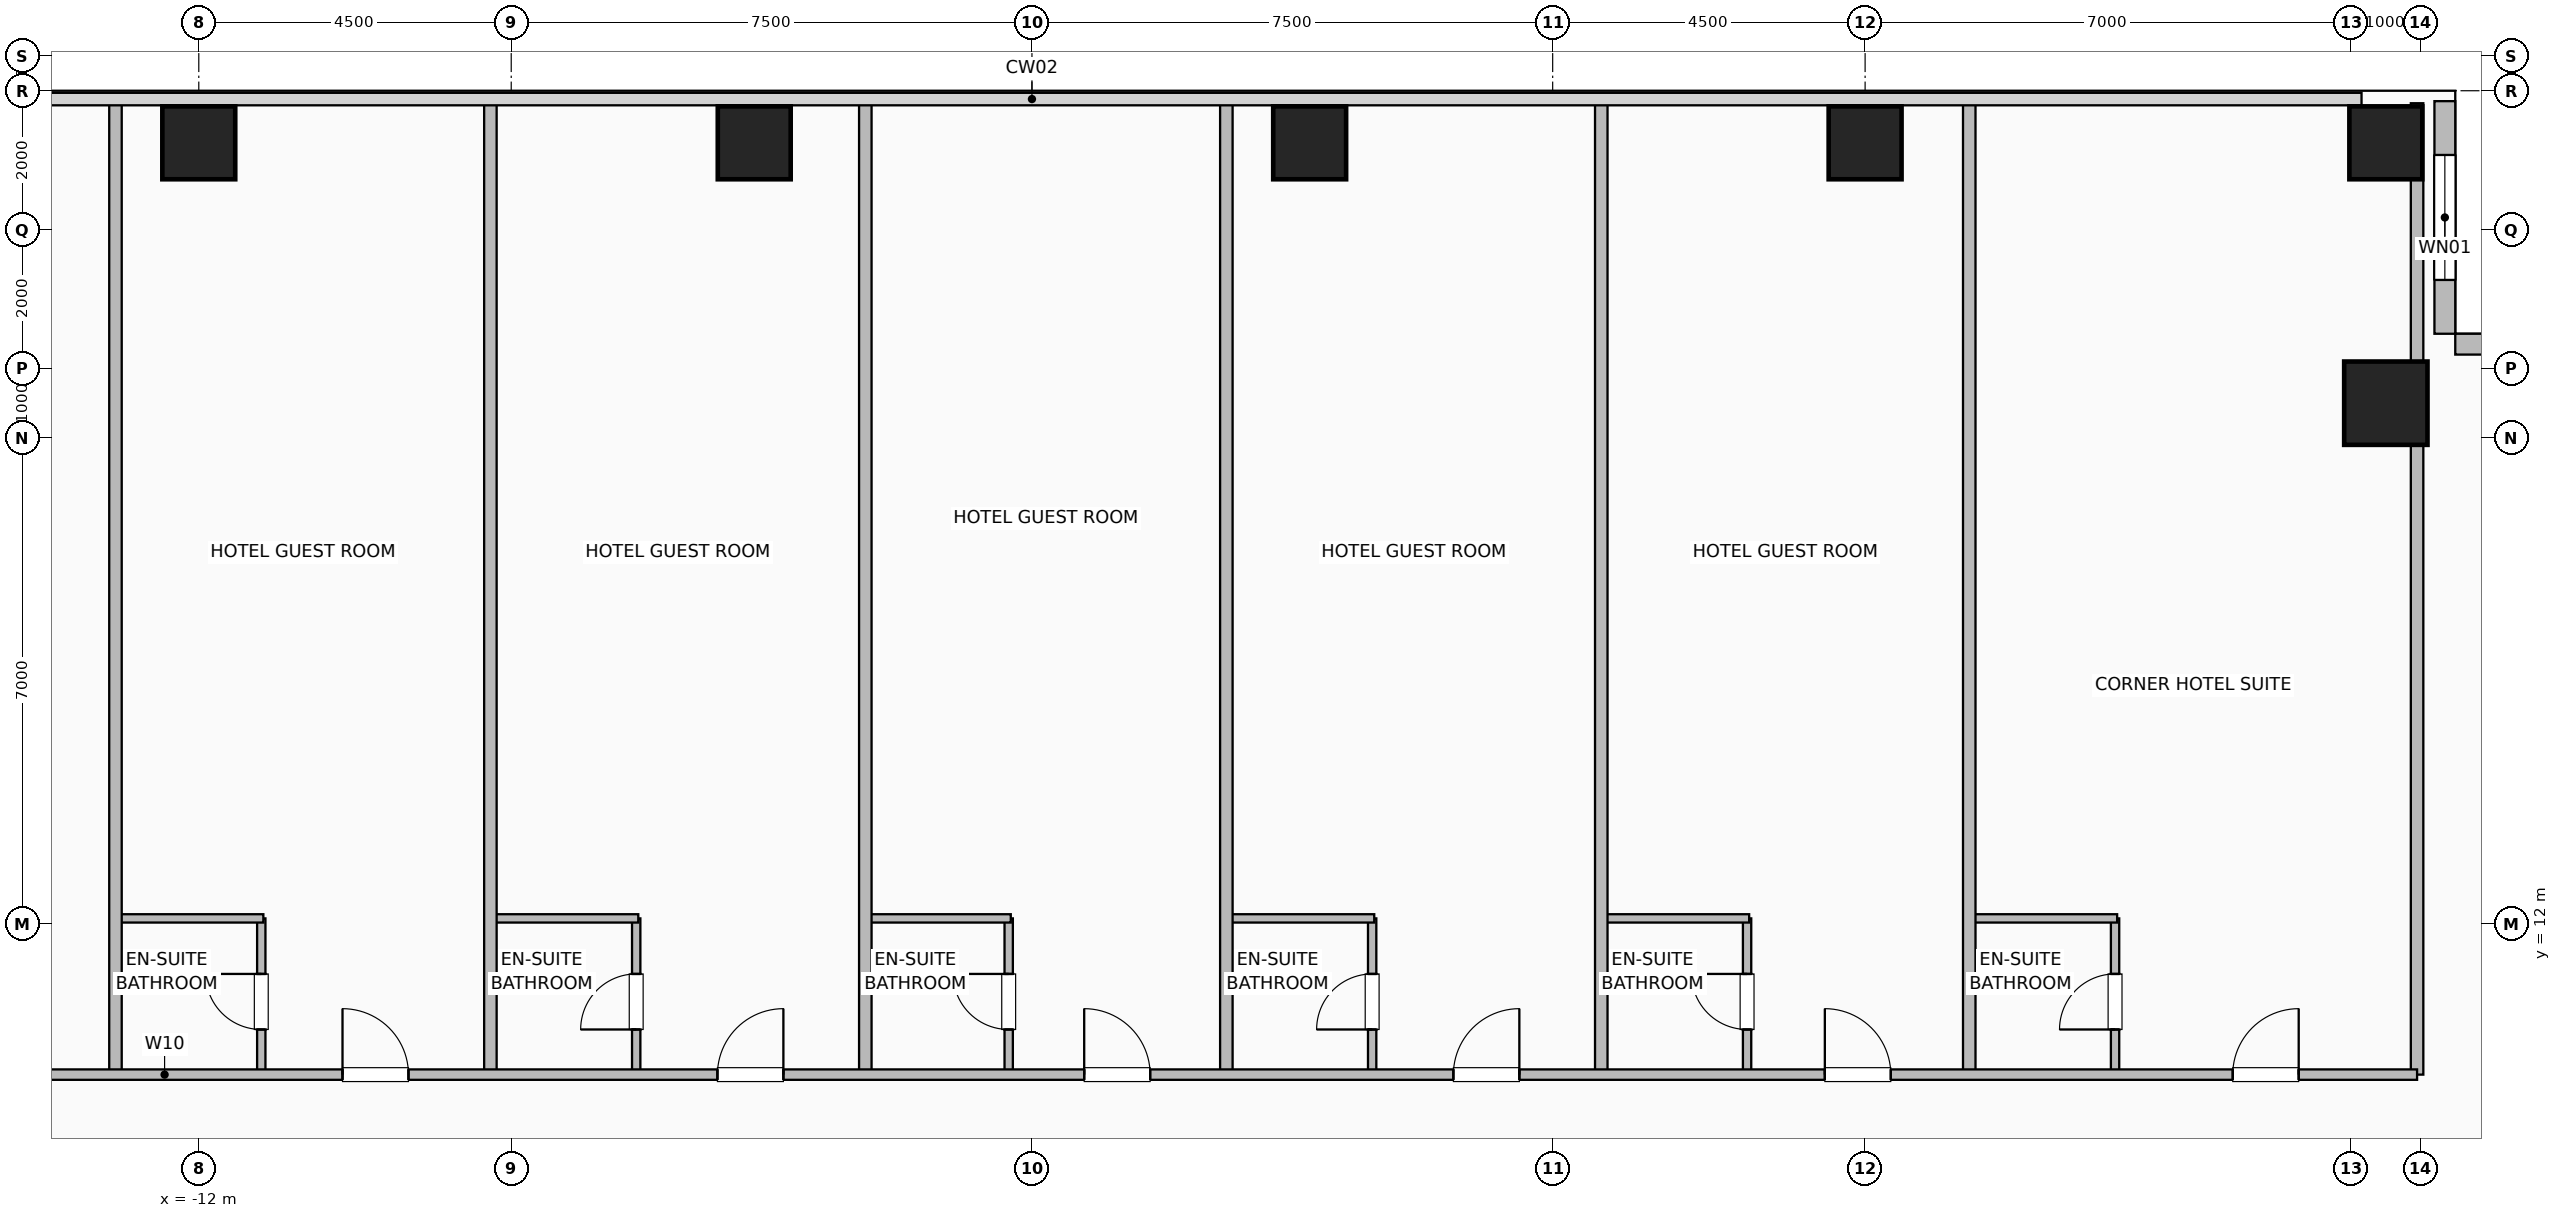
"""IFC4 building model, lengths in metres.
Left out: names, types, materials, properties, quantities, classifications, styles, units other than length and angle.
Written with IfcOpenShell. Run it as: python <this file> out.ifc"""

import sys

from ifc_helpers import new_model, si_unit, direction, frame, frame_2d, origin, origin_2d, place, context, subcontext, project, spatial, rectangle, hollow_rectangle, extrude, element, fill, save


model = new_model("IFC4")
c1 = context("Model", 3, precision=1e-05, world=origin(), true_north=direction((0.0, 1.0)))
c2 = subcontext(c1, "Body", "Model", "MODEL_VIEW")
j1 = project(units=[si_unit("LENGTHUNIT", "METRE"), si_unit("PLANEANGLEUNIT", "RADIAN")], contexts=[c1])
p1 = place(None, origin())
s1 = spatial("IfcSite", under=j1, at=p1, CompositionType="ELEMENT")
p2 = place(p1, origin())
s2 = spatial("IfcBuilding", under=s1, at=p2, CompositionType="ELEMENT")
p3 = place(p2, frame((0.0, 0.0, 30.5)))
s3 = spatial("IfcBuildingStorey", under=s2, at=p3, CompositionType="ELEMENT", Elevation=30.5)
for number, where, z_axis, x_axis in (
    (1, (-12.0, 23.25, 0.0), (0.0, 0.0, 1.0), (1.0, 0.0, 0.0)),
    (2, (-4.0, 23.25, 0.0), (0.0, 0.0, 1.0), (1.0, 0.0, 0.0)),
    (3, (4.0, 23.25, 0.0), (0.0, 0.0, 1.0), (1.0, 0.0, 0.0)),
    (4, (12.0, 23.25, 0.0), (0.0, 0.0, 1.0), (1.0, 0.0, 0.0)),
    (5, (19.5, 23.25, 0.0), (0.0, 0.0, 1.0), (1.0, 0.0, 0.0)),
):
    element("IfcColumn", number, at=place(p3, frame(where, z_axis=z_axis, x_axis=x_axis)), inside=s3, PredefinedType="COLUMN", context=c2, shape_type="SweptSolid", body=[
        extrude(hollow_rectangle(XDim=1.05, YDim=1.05, WallThickness=0.05, at=origin_2d()), origin(), (0.0, 0.0, 1.0), 3.5),
    ])
p4 = place(p3, frame((19.5, 19.5, 0.0), z_axis=(0.0, 0.0, 1.0), x_axis=(1.0, 0.0, 0.0)))
e6 = element("IfcColumn", 6, at=p4, inside=s3, PredefinedType="COLUMN", context=c2, shape_type="SweptSolid", body=[
    extrude(hollow_rectangle(XDim=1.2, YDim=1.2, WallThickness=0.055, at=origin_2d()), origin(), (0.0, 0.0, 1.0), 3.5),
])
p5 = place(p3, frame((20.35, 23.85, 0.0), z_axis=(0.0, 0.0, 1.0), x_axis=(0.0, -1.0, 0.0)))
e7 = element("IfcWall", 7, at=p5, inside=s3, PredefinedType="SOLIDWALL", context=c2, shape_type="SweptSolid", body=[
    extrude(rectangle(XDim=3.35, YDim=0.3, at=frame_2d((1.675, 0.0))), origin(), (0.0, 0.0, 1.0), 3.25),
])
p6 = place(p5, frame((0.775, 0.0, 0.9)))
e8 = element("IfcOpeningElement", 8, at=p6, cuts=e7, PredefinedType="OPENING", context=c2, shape_type="SweptSolid", body=[
    extrude(rectangle(XDim=1.8, YDim=1.8, at=frame_2d((0.9, 0.9))), frame((0.0, 0.16, 0.0), z_axis=(0.0, -1.0, 0.0), x_axis=(1.0, 0.0, 0.0)), (0.0, 0.0, 1.0), 0.32),
])
p7 = place(p3, frame((23.85, 20.35, 0.0), z_axis=(0.0, 0.0, 1.0), x_axis=(-1.0, 0.0, 0.0)))
e9 = element("IfcWall", 9, at=p7, inside=s3, PredefinedType="SOLIDWALL", context=c2, shape_type="SweptSolid", body=[
    extrude(rectangle(XDim=3.35, YDim=0.3, at=frame_2d((1.675, 0.0))), origin(), (0.0, 0.0, 1.0), 3.25),
])
p8 = place(p3, frame((-11.1, 9.83, 0.0), z_axis=(0.0, 0.0, 1.0), x_axis=(0.0, 1.0, 0.0)))
e10 = element("IfcWall", 10, at=p8, inside=s3, PredefinedType="PLUMBINGWALL", context=c2, shape_type="SweptSolid", body=[
    extrude(rectangle(XDim=2.25, YDim=0.12, at=frame_2d((1.125, 0.0))), origin(), (0.0, 0.0, 1.0), 3.25),
])
p9 = place(p8, frame((0.65, 0.0, 0.0)))
e11 = element("IfcOpeningElement", 11, at=p9, cuts=e10, PredefinedType="OPENING", context=c2, shape_type="SweptSolid", body=[
    extrude(rectangle(XDim=0.8, YDim=2.05, at=frame_2d((0.4, 1.025))), frame((0.0, 0.07, 0.0), z_axis=(0.0, -1.0, 0.0), x_axis=(1.0, 0.0, 0.0)), (0.0, 0.0, 1.0), 0.14),
])
p10 = place(p3, frame((-13.17, 12.08, 0.0), z_axis=(0.0, 0.0, 1.0), x_axis=(1.0, 0.0, 0.0)))
e12 = element("IfcWall", 12, at=p10, inside=s3, PredefinedType="PLUMBINGWALL", context=c2, shape_type="SweptSolid", body=[
    extrude(rectangle(XDim=2.1, YDim=0.12, at=frame_2d((1.05, 0.0))), origin(), (0.0, 0.0, 1.0), 3.25),
])
p11 = place(p3, frame((-5.7, 9.83, 0.0), z_axis=(0.0, 0.0, 1.0), x_axis=(0.0, 1.0, 0.0)))
e13 = element("IfcWall", 13, at=p11, inside=s3, PredefinedType="PLUMBINGWALL", context=c2, shape_type="SweptSolid", body=[
    extrude(rectangle(XDim=2.25, YDim=0.12, at=frame_2d((1.125, 0.0))), origin(), (0.0, 0.0, 1.0), 3.25),
])
p12 = place(p11, frame((0.65, 0.0, 0.0)))
e14 = element("IfcOpeningElement", 14, at=p12, cuts=e13, PredefinedType="OPENING", context=c2, shape_type="SweptSolid", body=[
    extrude(rectangle(XDim=0.8, YDim=2.05, at=frame_2d((0.4, 1.025))), frame((0.0, 0.07, 0.0), z_axis=(0.0, -1.0, 0.0), x_axis=(1.0, 0.0, 0.0)), (0.0, 0.0, 1.0), 0.14),
])
p13 = place(p3, frame((-7.77, 12.08, 0.0), z_axis=(0.0, 0.0, 1.0), x_axis=(1.0, 0.0, 0.0)))
e15 = element("IfcWall", 15, at=p13, inside=s3, PredefinedType="PLUMBINGWALL", context=c2, shape_type="SweptSolid", body=[
    extrude(rectangle(XDim=2.1, YDim=0.12, at=frame_2d((1.05, 0.0))), origin(), (0.0, 0.0, 1.0), 3.25),
])
p14 = place(p3, frame((-0.335, 9.83, 0.0), z_axis=(0.0, 0.0, 1.0), x_axis=(0.0, 1.0, 0.0)))
e16 = element("IfcWall", 16, at=p14, inside=s3, PredefinedType="PLUMBINGWALL", context=c2, shape_type="SweptSolid", body=[
    extrude(rectangle(XDim=2.25, YDim=0.12, at=frame_2d((1.125, 0.0))), origin(), (0.0, 0.0, 1.0), 3.25),
])
p15 = place(p14, frame((0.65, 0.0, 0.0)))
e17 = element("IfcOpeningElement", 17, at=p15, cuts=e16, PredefinedType="OPENING", context=c2, shape_type="SweptSolid", body=[
    extrude(rectangle(XDim=0.8, YDim=2.05, at=frame_2d((0.4, 1.025))), frame((0.0, 0.07, 0.0), z_axis=(0.0, -1.0, 0.0), x_axis=(1.0, 0.0, 0.0)), (0.0, 0.0, 1.0), 0.14),
])
p16 = place(p3, frame((-2.37, 12.08, 0.0), z_axis=(0.0, 0.0, 1.0), x_axis=(1.0, 0.0, 0.0)))
e18 = element("IfcWall", 18, at=p16, inside=s3, PredefinedType="PLUMBINGWALL", context=c2, shape_type="SweptSolid", body=[
    extrude(rectangle(XDim=2.065, YDim=0.12, at=frame_2d((1.033, 0.0))), origin(), (0.0, 0.0, 1.0), 3.25),
])
p17 = place(p3, frame((4.9, 9.83, 0.0), z_axis=(0.0, 0.0, 1.0), x_axis=(0.0, 1.0, 0.0)))
e19 = element("IfcWall", 19, at=p17, inside=s3, PredefinedType="PLUMBINGWALL", context=c2, shape_type="SweptSolid", body=[
    extrude(rectangle(XDim=2.25, YDim=0.12, at=frame_2d((1.125, 0.0))), origin(), (0.0, 0.0, 1.0), 3.25),
])
p18 = place(p17, frame((0.65, 0.0, 0.0)))
e20 = element("IfcOpeningElement", 20, at=p18, cuts=e19, PredefinedType="OPENING", context=c2, shape_type="SweptSolid", body=[
    extrude(rectangle(XDim=0.8, YDim=2.05, at=frame_2d((0.4, 1.025))), frame((0.0, 0.07, 0.0), z_axis=(0.0, -1.0, 0.0), x_axis=(1.0, 0.0, 0.0)), (0.0, 0.0, 1.0), 0.14),
])
p19 = place(p3, frame((2.83, 12.08, 0.0), z_axis=(0.0, 0.0, 1.0), x_axis=(1.0, 0.0, 0.0)))
e21 = element("IfcWall", 21, at=p19, inside=s3, PredefinedType="PLUMBINGWALL", context=c2, shape_type="SweptSolid", body=[
    extrude(rectangle(XDim=2.1, YDim=0.12, at=frame_2d((1.05, 0.0))), origin(), (0.0, 0.0, 1.0), 3.25),
])
p20 = place(p3, frame((10.3, 9.83, 0.0), z_axis=(0.0, 0.0, 1.0), x_axis=(0.0, 1.0, 0.0)))
e22 = element("IfcWall", 22, at=p20, inside=s3, PredefinedType="PLUMBINGWALL", context=c2, shape_type="SweptSolid", body=[
    extrude(rectangle(XDim=2.25, YDim=0.12, at=frame_2d((1.125, 0.0))), origin(), (0.0, 0.0, 1.0), 3.25),
])
p21 = place(p20, frame((0.65, 0.0, 0.0)))
e23 = element("IfcOpeningElement", 23, at=p21, cuts=e22, PredefinedType="OPENING", context=c2, shape_type="SweptSolid", body=[
    extrude(rectangle(XDim=0.8, YDim=2.05, at=frame_2d((0.4, 1.025))), frame((0.0, 0.07, 0.0), z_axis=(0.0, -1.0, 0.0), x_axis=(1.0, 0.0, 0.0)), (0.0, 0.0, 1.0), 0.14),
])
p22 = place(p3, frame((8.23, 12.08, 0.0), z_axis=(0.0, 0.0, 1.0), x_axis=(1.0, 0.0, 0.0)))
e24 = element("IfcWall", 24, at=p22, inside=s3, PredefinedType="PLUMBINGWALL", context=c2, shape_type="SweptSolid", body=[
    extrude(rectangle(XDim=2.1, YDim=0.12, at=frame_2d((1.05, 0.0))), origin(), (0.0, 0.0, 1.0), 3.25),
])
p23 = place(p3, frame((15.6, 9.83, 0.0), z_axis=(0.0, 0.0, 1.0), x_axis=(0.0, 1.0, 0.0)))
e25 = element("IfcWall", 25, at=p23, inside=s3, PredefinedType="PLUMBINGWALL", context=c2, shape_type="SweptSolid", body=[
    extrude(rectangle(XDim=2.25, YDim=0.12, at=frame_2d((1.125, 0.0))), origin(), (0.0, 0.0, 1.0), 3.25),
])
p24 = place(p23, frame((0.65, 0.0, 0.0)))
e26 = element("IfcOpeningElement", 26, at=p24, cuts=e25, PredefinedType="OPENING", context=c2, shape_type="SweptSolid", body=[
    extrude(rectangle(XDim=0.8, YDim=2.05, at=frame_2d((0.4, 1.025))), frame((0.0, 0.07, 0.0), z_axis=(0.0, -1.0, 0.0), x_axis=(1.0, 0.0, 0.0)), (0.0, 0.0, 1.0), 0.14),
])
p25 = place(p3, frame((13.53, 12.08, 0.0), z_axis=(0.0, 0.0, 1.0), x_axis=(1.0, 0.0, 0.0)))
e27 = element("IfcWall", 27, at=p25, inside=s3, PredefinedType="PLUMBINGWALL", context=c2, shape_type="SweptSolid", body=[
    extrude(rectangle(XDim=2.1, YDim=0.12, at=frame_2d((1.05, 0.0))), origin(), (0.0, 0.0, 1.0), 3.25),
])
for number, where, z_axis, x_axis in (
    (28, (-13.2, 9.83, 0.0), (0.0, 0.0, 1.0), (0.0, 1.0, 0.0)),
    (29, (-7.8, 9.83, 0.0), (0.0, 0.0, 1.0), (0.0, 1.0, 0.0)),
    (30, (-2.4, 9.83, 0.0), (0.0, 0.0, 1.0), (0.0, 1.0, 0.0)),
    (31, (2.8, 9.83, 0.0), (0.0, 0.0, 1.0), (0.0, 1.0, 0.0)),
    (32, (8.2, 9.83, 0.0), (0.0, 0.0, 1.0), (0.0, 1.0, 0.0)),
    (33, (13.5, 9.83, 0.0), (0.0, 0.0, 1.0), (0.0, 1.0, 0.0)),
    (34, (19.95, 9.83, 0.0), (0.0, 0.0, 1.0), (0.0, 1.0, 0.0)),
):
    element("IfcWall", number, at=place(p3, frame(where, z_axis=z_axis, x_axis=x_axis)), inside=s3, PredefinedType="PARTITIONING", context=c2, shape_type="SweptSolid", body=[
        extrude(rectangle(XDim=13.99, YDim=0.18, at=frame_2d((6.995, 0.0))), origin(), (0.0, 0.0, 1.0), 3.25),
    ])
p26 = place(p3, frame((-19.95, 9.83, 0.0), z_axis=(0.0, 0.0, 1.0), x_axis=(1.0, 0.0, 0.0)))
e35 = element("IfcWall", 35, at=p26, inside=s3, PredefinedType="PARTITIONING", context=c2, shape_type="SweptSolid", body=[
    extrude(rectangle(XDim=39.9, YDim=0.15, at=frame_2d((19.95, 0.0))), origin(), (0.0, 0.0, 1.0), 3.25),
])
p27 = place(p26, frame((3.945, 0.0, 0.0)))
e36 = element("IfcOpeningElement", 36, at=p27, cuts=e35, PredefinedType="OPENING", context=c2, shape_type="SweptSolid", body=[
    extrude(rectangle(XDim=0.95, YDim=2.08, at=frame_2d((0.475, 1.04))), frame((0.0, 0.085, 0.0), z_axis=(0.0, -1.0, 0.0), x_axis=(1.0, 0.0, 0.0)), (0.0, 0.0, 1.0), 0.17),
])
p28 = place(p26, frame((10.02, 0.0, 0.0)))
e37 = element("IfcOpeningElement", 37, at=p28, cuts=e35, PredefinedType="OPENING", context=c2, shape_type="SweptSolid", body=[
    extrude(rectangle(XDim=0.95, YDim=2.08, at=frame_2d((0.475, 1.04))), frame((0.0, 0.085, 0.0), z_axis=(0.0, -1.0, 0.0), x_axis=(1.0, 0.0, 0.0)), (0.0, 0.0, 1.0), 0.17),
])
p29 = place(p26, frame((15.42, 0.0, 0.0)))
e38 = element("IfcOpeningElement", 38, at=p29, cuts=e35, PredefinedType="OPENING", context=c2, shape_type="SweptSolid", body=[
    extrude(rectangle(XDim=0.95, YDim=2.08, at=frame_2d((0.475, 1.04))), frame((0.0, 0.085, 0.0), z_axis=(0.0, -1.0, 0.0), x_axis=(1.0, 0.0, 0.0)), (0.0, 0.0, 1.0), 0.17),
])
p30 = place(p26, frame((20.702, 0.0, 0.0)))
e39 = element("IfcOpeningElement", 39, at=p30, cuts=e35, PredefinedType="OPENING", context=c2, shape_type="SweptSolid", body=[
    extrude(rectangle(XDim=0.95, YDim=2.08, at=frame_2d((0.475, 1.04))), frame((0.0, 0.085, 0.0), z_axis=(0.0, -1.0, 0.0), x_axis=(1.0, 0.0, 0.0)), (0.0, 0.0, 1.0), 0.17),
])
p31 = place(p26, frame((26.02, 0.0, 0.0)))
e40 = element("IfcOpeningElement", 40, at=p31, cuts=e35, PredefinedType="OPENING", context=c2, shape_type="SweptSolid", body=[
    extrude(rectangle(XDim=0.95, YDim=2.08, at=frame_2d((0.475, 1.04))), frame((0.0, 0.085, 0.0), z_axis=(0.0, -1.0, 0.0), x_axis=(1.0, 0.0, 0.0)), (0.0, 0.0, 1.0), 0.17),
])
p32 = place(p26, frame((31.37, 0.0, 0.0)))
e41 = element("IfcOpeningElement", 41, at=p32, cuts=e35, PredefinedType="OPENING", context=c2, shape_type="SweptSolid", body=[
    extrude(rectangle(XDim=0.95, YDim=2.08, at=frame_2d((0.475, 1.04))), frame((0.0, 0.085, 0.0), z_axis=(0.0, -1.0, 0.0), x_axis=(1.0, 0.0, 0.0)), (0.0, 0.0, 1.0), 0.17),
])
p33 = place(p26, frame((37.245, 0.0, 0.0)))
e42 = element("IfcOpeningElement", 42, at=p33, cuts=e35, PredefinedType="OPENING", context=c2, shape_type="SweptSolid", body=[
    extrude(rectangle(XDim=0.95, YDim=2.08, at=frame_2d((0.475, 1.04))), frame((0.0, 0.085, 0.0), z_axis=(0.0, -1.0, 0.0), x_axis=(1.0, 0.0, 0.0)), (0.0, 0.0, 1.0), 0.17),
])
p34 = place(p6, origin())
e43 = element("IfcWindow", 43, at=p34, inside=s3, PartitioningType="SINGLE_PANEL", PredefinedType="WINDOW", context=c2, shape_type="SweptSolid", body=[
    extrude(rectangle(XDim=1.8, YDim=1.8, at=frame_2d((0.9, 0.9))), frame((0.0, 0.03, 0.0), z_axis=(0.0, -1.0, 0.0), x_axis=(1.0, 0.0, 0.0)), (0.0, 0.0, 1.0), 0.06),
])
fill(e8, e43)
p35 = place(p9, origin())
e44 = element("IfcDoor", 44, at=p35, inside=s3, OperationType="SINGLE_SWING_RIGHT", PredefinedType="DOOR", context=c2, shape_type="SweptSolid", body=[
    extrude(rectangle(XDim=0.8, YDim=2.05, at=frame_2d((0.4, 1.025))), frame((0.0, 0.025, 0.0), z_axis=(0.0, -1.0, 0.0), x_axis=(1.0, 0.0, 0.0)), (0.0, 0.0, 1.0), 0.05),
])
fill(e11, e44)
p36 = place(p12, origin())
e45 = element("IfcDoor", 45, at=p36, inside=s3, OperationType="SINGLE_SWING_LEFT", PredefinedType="DOOR", context=c2, shape_type="SweptSolid", body=[
    extrude(rectangle(XDim=0.8, YDim=2.05, at=frame_2d((0.4, 1.025))), frame((0.0, 0.025, 0.0), z_axis=(0.0, -1.0, 0.0), x_axis=(1.0, 0.0, 0.0)), (0.0, 0.0, 1.0), 0.05),
])
fill(e14, e45)
p37 = place(p15, origin())
e46 = element("IfcDoor", 46, at=p37, inside=s3, OperationType="SINGLE_SWING_RIGHT", PredefinedType="DOOR", context=c2, shape_type="SweptSolid", body=[
    extrude(rectangle(XDim=0.8, YDim=2.05, at=frame_2d((0.4, 1.025))), frame((0.0, 0.025, 0.0), z_axis=(0.0, -1.0, 0.0), x_axis=(1.0, 0.0, 0.0)), (0.0, 0.0, 1.0), 0.05),
])
fill(e17, e46)
p38 = place(p18, origin())
e47 = element("IfcDoor", 47, at=p38, inside=s3, OperationType="SINGLE_SWING_LEFT", PredefinedType="DOOR", context=c2, shape_type="SweptSolid", body=[
    extrude(rectangle(XDim=0.8, YDim=2.05, at=frame_2d((0.4, 1.025))), frame((0.0, 0.025, 0.0), z_axis=(0.0, -1.0, 0.0), x_axis=(1.0, 0.0, 0.0)), (0.0, 0.0, 1.0), 0.05),
])
fill(e20, e47)
p39 = place(p21, origin())
e48 = element("IfcDoor", 48, at=p39, inside=s3, OperationType="SINGLE_SWING_RIGHT", PredefinedType="DOOR", context=c2, shape_type="SweptSolid", body=[
    extrude(rectangle(XDim=0.8, YDim=2.05, at=frame_2d((0.4, 1.025))), frame((0.0, 0.025, 0.0), z_axis=(0.0, -1.0, 0.0), x_axis=(1.0, 0.0, 0.0)), (0.0, 0.0, 1.0), 0.05),
])
fill(e23, e48)
p40 = place(p24, origin())
e49 = element("IfcDoor", 49, at=p40, inside=s3, OperationType="SINGLE_SWING_LEFT", PredefinedType="DOOR", context=c2, shape_type="SweptSolid", body=[
    extrude(rectangle(XDim=0.8, YDim=2.05, at=frame_2d((0.4, 1.025))), frame((0.0, 0.025, 0.0), z_axis=(0.0, -1.0, 0.0), x_axis=(1.0, 0.0, 0.0)), (0.0, 0.0, 1.0), 0.05),
])
fill(e26, e49)
p41 = place(p28, origin())
e50 = element("IfcDoor", 50, at=p41, inside=s3, OperationType="SINGLE_SWING_LEFT", PredefinedType="DOOR", context=c2, shape_type="SweptSolid", body=[
    extrude(rectangle(XDim=0.95, YDim=2.08, at=frame_2d((0.475, 1.04))), frame((0.0, 0.025, 0.0), z_axis=(0.0, -1.0, 0.0), x_axis=(1.0, 0.0, 0.0)), (0.0, 0.0, 1.0), 0.05),
])
fill(e37, e50)
p42 = place(p29, origin())
e51 = element("IfcDoor", 51, at=p42, inside=s3, OperationType="SINGLE_SWING_RIGHT", PredefinedType="DOOR", context=c2, shape_type="SweptSolid", body=[
    extrude(rectangle(XDim=0.95, YDim=2.08, at=frame_2d((0.475, 1.04))), frame((0.0, 0.025, 0.0), z_axis=(0.0, -1.0, 0.0), x_axis=(1.0, 0.0, 0.0)), (0.0, 0.0, 1.0), 0.05),
])
fill(e38, e51)
p43 = place(p30, origin())
e52 = element("IfcDoor", 52, at=p43, inside=s3, OperationType="SINGLE_SWING_LEFT", PredefinedType="DOOR", context=c2, shape_type="SweptSolid", body=[
    extrude(rectangle(XDim=0.95, YDim=2.08, at=frame_2d((0.475, 1.04))), frame((0.0, 0.025, 0.0), z_axis=(0.0, -1.0, 0.0), x_axis=(1.0, 0.0, 0.0)), (0.0, 0.0, 1.0), 0.05),
])
fill(e39, e52)
p44 = place(p31, origin())
e53 = element("IfcDoor", 53, at=p44, inside=s3, OperationType="SINGLE_SWING_RIGHT", PredefinedType="DOOR", context=c2, shape_type="SweptSolid", body=[
    extrude(rectangle(XDim=0.95, YDim=2.08, at=frame_2d((0.475, 1.04))), frame((0.0, 0.025, 0.0), z_axis=(0.0, -1.0, 0.0), x_axis=(1.0, 0.0, 0.0)), (0.0, 0.0, 1.0), 0.05),
])
fill(e40, e53)
p45 = place(p32, origin())
e54 = element("IfcDoor", 54, at=p45, inside=s3, OperationType="SINGLE_SWING_LEFT", PredefinedType="DOOR", context=c2, shape_type="SweptSolid", body=[
    extrude(rectangle(XDim=0.95, YDim=2.08, at=frame_2d((0.475, 1.04))), frame((0.0, 0.025, 0.0), z_axis=(0.0, -1.0, 0.0), x_axis=(1.0, 0.0, 0.0)), (0.0, 0.0, 1.0), 0.05),
])
fill(e41, e54)
p46 = place(p33, origin())
e55 = element("IfcDoor", 55, at=p46, inside=s3, OperationType="SINGLE_SWING_RIGHT", PredefinedType="DOOR", context=c2, shape_type="SweptSolid", body=[
    extrude(rectangle(XDim=0.95, YDim=2.08, at=frame_2d((0.475, 1.04))), frame((0.0, 0.025, 0.0), z_axis=(0.0, -1.0, 0.0), x_axis=(1.0, 0.0, 0.0)), (0.0, 0.0, 1.0), 0.05),
])
fill(e42, e55)
save(model, sys.argv[1])
